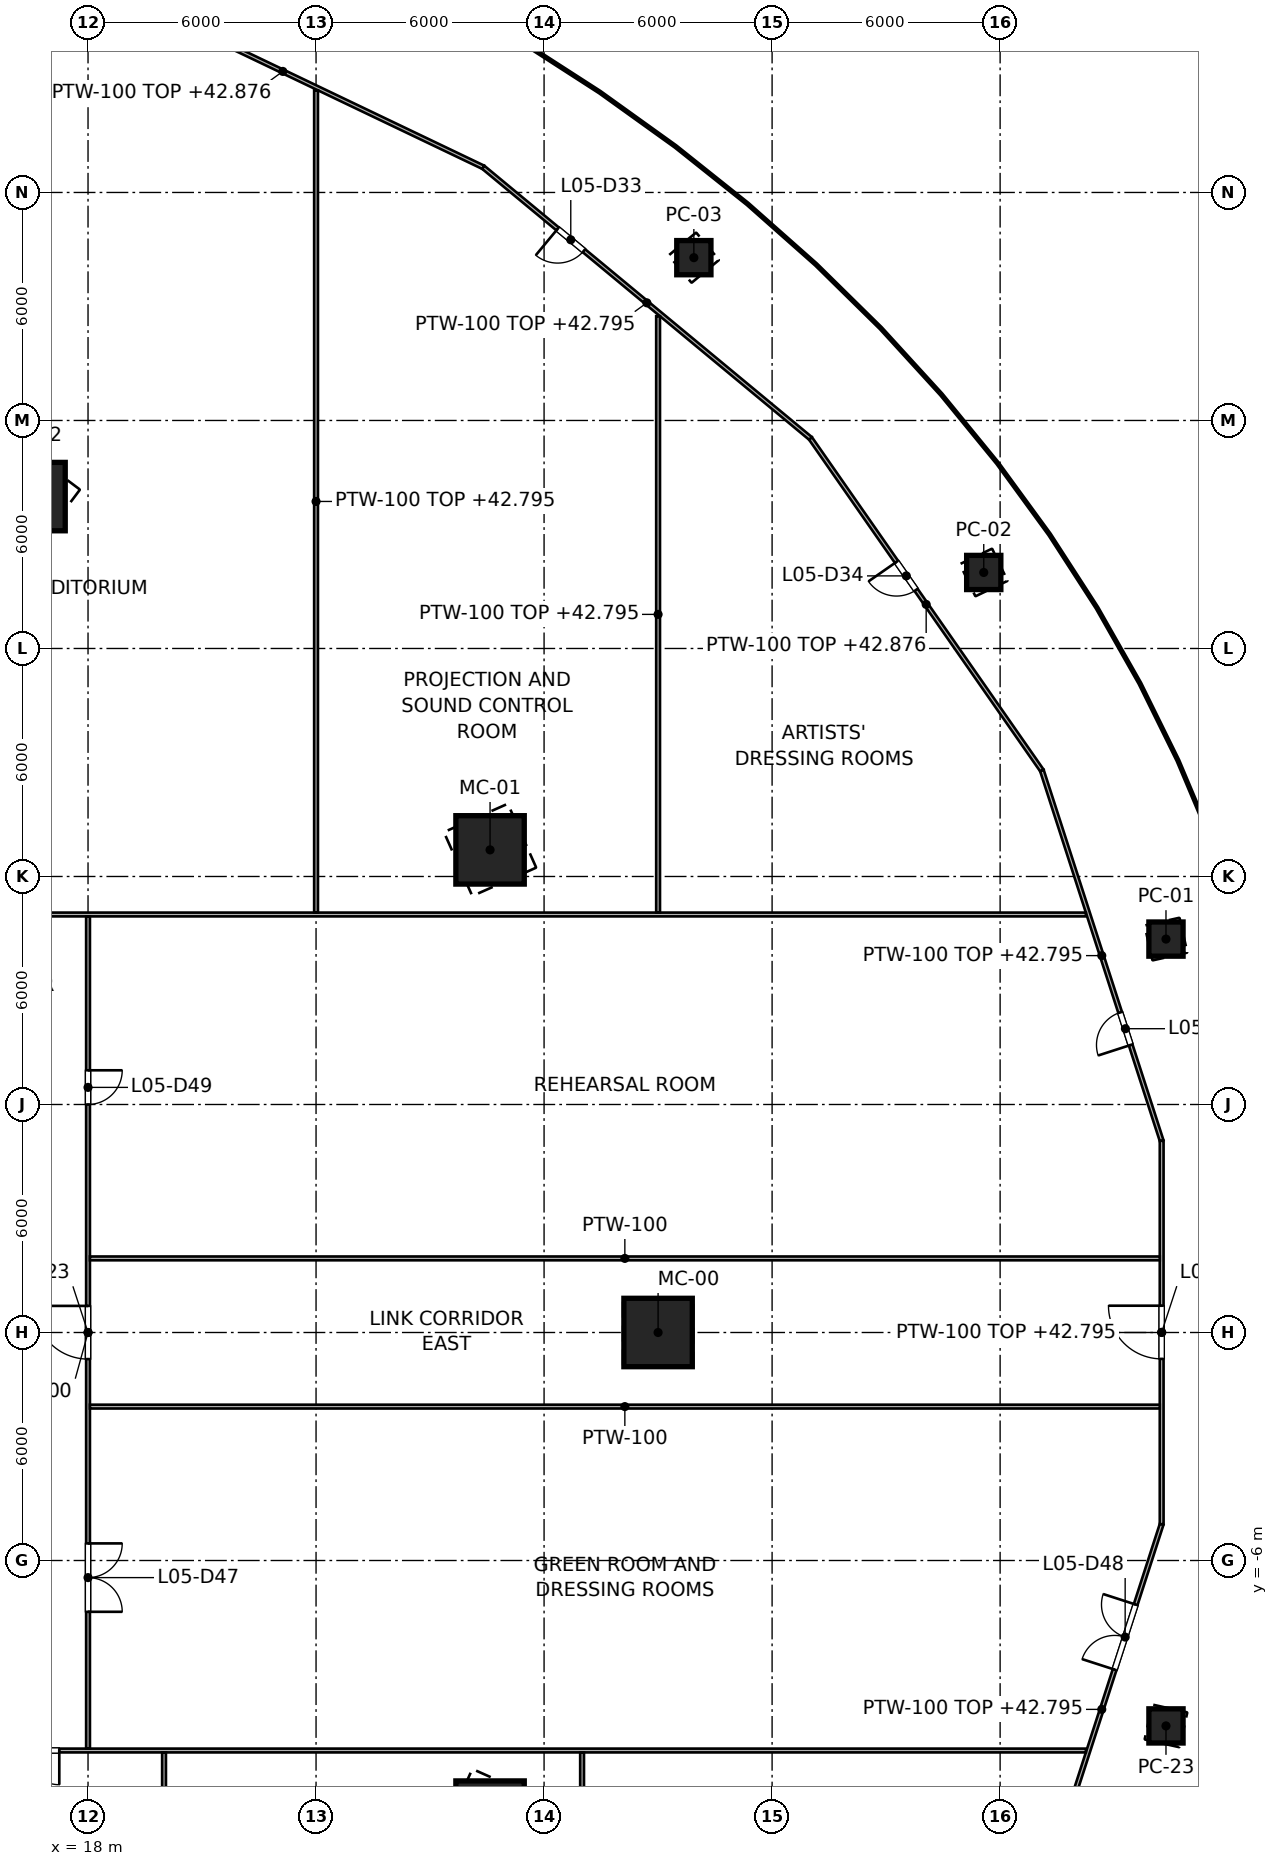
"""IFC4 building model, lengths in metres.
Left out: names, types, materials, properties, quantities, classifications, styles, units other than length and angle.
Written with IfcOpenShell. Run it as: python <this file> out.ifc"""

import sys

from ifc_helpers import new_model, si_unit, direction, frame, frame_2d, origin, origin_2d, place, context, subcontext, project, spatial, rectangle, hollow_rectangle, extrude, element, fill, save


model = new_model("IFC4")
c1 = context("Model", 3, precision=1e-05, world=origin(), true_north=direction((0.0, 1.0)))
c2 = subcontext(c1, "Body", "Model", "MODEL_VIEW")
j1 = project(units=[si_unit("LENGTHUNIT", "METRE"), si_unit("PLANEANGLEUNIT", "RADIAN")], contexts=[c1])
p1 = place(None, origin())
s1 = spatial("IfcSite", under=j1, at=p1, CompositionType="ELEMENT")
p2 = place(p1, origin())
s2 = spatial("IfcBuilding", under=s1, at=p2, CompositionType="ELEMENT")
p3 = place(p2, frame((0.0, 0.0, 37.4)))
s3 = spatial("IfcBuildingStorey", under=s2, at=p3, CompositionType="ELEMENT", Elevation=37.4)
for number, where, z_axis, x_axis in (
    (1, (33.0, 0.0, 0.0), (0.0, 0.0, 1.0), (1.0, 0.0, 0.0)),
    (2, (28.579, 12.7, 0.0), (0.0, 0.0, 1.0), (0.914, 0.406, 0.0)),
    (3, (16.5, 21.997, 0.0), (0.0, 0.0, 1.0), (0.6, 0.8, 0.0)),
    (4, (28.579, -12.7, 0.0), (0.0, 0.0, 1.0), (0.914, -0.406, 0.0)),
):
    element("IfcColumn", number, at=place(p3, frame(where, z_axis=z_axis, x_axis=x_axis)), inside=s3, PredefinedType="COLUMN", context=c2, shape_type="SweptSolid", body=[
        extrude(hollow_rectangle(XDim=1.8, YDim=1.8, WallThickness=0.08, at=origin_2d()), origin(), (0.0, 0.0, 1.0), 5.9),
    ])
for number, where, z_axis, x_axis in (
    (5, (46.365, 10.353, 0.0), (0.0, 0.0, 1.0), (0.976, 0.218, 0.0)),
    (6, (41.569, 20.0, 0.0), (0.0, 0.0, 1.0), (0.901, 0.434, 0.0)),
    (7, (33.941, 28.284, 0.0), (0.0, 0.0, 1.0), (0.768, 0.64, 0.0)),
    (8, (46.365, -10.353, 0.0), (0.0, 0.0, 1.0), (0.976, -0.218, 0.0)),
):
    element("IfcColumn", number, at=place(p3, frame(where, z_axis=z_axis, x_axis=x_axis)), inside=s3, PredefinedType="COLUMN", context=c2, shape_type="SweptSolid", body=[
        extrude(hollow_rectangle(XDim=0.9, YDim=0.9, WallThickness=0.04, at=origin_2d()), origin(), (0.0, 0.0, 1.0), 6.6),
    ])
p4 = place(p3, frame((46.251, 5.045, 0.0), z_axis=(0.0, 0.0, 1.0), x_axis=(-0.307713034182, 0.951479210805, 0.0)))
e9 = element("IfcWall", 9, at=p4, inside=s3, PredefinedType="PARTITIONING", context=c2, shape_type="SweptSolid", body=[
    extrude(rectangle(XDim=10.243, YDim=0.1, at=frame_2d((5.122, 0.0))), origin(), (0.0, 0.0, 1.0), 5.395),
])
p5 = place(p4, frame((2.65, 0.0, 0.0)))
e10 = element("IfcOpeningElement", 10, at=p5, cuts=e9, PredefinedType="OPENING", context=c2, shape_type="SweptSolid", body=[
    extrude(rectangle(XDim=0.9, YDim=2.1, at=frame_2d((0.45, 1.05))), frame((0.0, 0.05, 0.0), z_axis=(0.0, -1.0, 0.0), x_axis=(1.0, 0.0, 0.0)), (0.0, 0.0, 1.0), 0.1),
])
p6 = place(p3, frame((43.099, 14.791, 0.0), z_axis=(0.0, 0.0, 1.0), x_axis=(-0.571737958261, 0.820436290692, 0.0)))
e11 = element("IfcWall", 11, at=p6, inside=s3, PredefinedType="PARTITIONING", context=c2, shape_type="SweptSolid", body=[
    extrude(rectangle(XDim=10.65, YDim=0.1, at=frame_2d((5.325, 0.0))), origin(), (0.0, 0.0, 1.0), 5.476),
])
p7 = place(p6, frame((5.79, 0.0, 0.0)))
e12 = element("IfcOpeningElement", 12, at=p7, cuts=e11, PredefinedType="OPENING", context=c2, shape_type="SweptSolid", body=[
    extrude(rectangle(XDim=0.9, YDim=2.1, at=frame_2d((0.45, 1.05))), frame((0.0, 0.05, 0.0), z_axis=(0.0, -1.0, 0.0), x_axis=(1.0, 0.0, 0.0)), (0.0, 0.0, 1.0), 0.1),
])
p8 = place(p3, frame((37.01, 23.529, 0.0), z_axis=(0.0, 0.0, 1.0), x_axis=(-0.770046995363, 0.637987166746, 0.0)))
e13 = element("IfcWall", 13, at=p8, inside=s3, PredefinedType="PARTITIONING", context=c2, shape_type="SweptSolid", body=[
    extrude(rectangle(XDim=11.183, YDim=0.1, at=frame_2d((5.591, 0.0))), origin(), (0.0, 0.0, 1.0), 5.395),
])
p9 = place(p8, frame((7.741, 0.0, 0.0)))
e14 = element("IfcOpeningElement", 14, at=p9, cuts=e13, PredefinedType="OPENING", context=c2, shape_type="SweptSolid", body=[
    extrude(rectangle(XDim=0.9, YDim=2.1, at=frame_2d((0.45, 1.05))), frame((0.0, 0.05, 0.0), z_axis=(0.0, -1.0, 0.0), x_axis=(1.0, 0.0, 0.0)), (0.0, 0.0, 1.0), 0.1),
])
p10 = place(p3, frame((28.399, 30.663, 0.0), z_axis=(0.0, 0.0, 1.0), x_axis=(-0.902100999032, 0.431524955878, 0.0)))
e15 = element("IfcWall", 15, at=p10, inside=s3, PredefinedType="PARTITIONING", context=c2, shape_type="SweptSolid", body=[
    extrude(rectangle(XDim=11.691, YDim=0.1, at=frame_2d((5.845, 0.0))), origin(), (0.0, 0.0, 1.0), 5.476),
])
p11 = place(p3, frame((43.099, -14.791, 0.0), z_axis=(0.0, 0.0, 1.0), x_axis=(0.307713034182, 0.951479210805, 0.0)))
e16 = element("IfcWall", 16, at=p11, inside=s3, PredefinedType="PARTITIONING", context=c2, shape_type="SweptSolid", body=[
    extrude(rectangle(XDim=10.243, YDim=0.1, at=frame_2d((5.122, 0.0))), origin(), (0.0, 0.0, 1.0), 5.395),
])
p12 = place(p11, frame((6.221, 0.0, 0.0)))
e17 = element("IfcOpeningElement", 17, at=p12, cuts=e16, PredefinedType="OPENING", context=c2, shape_type="SweptSolid", body=[
    extrude(rectangle(XDim=1.8, YDim=2.1, at=frame_2d((0.9, 1.05))), frame((0.0, 0.05, 0.0), z_axis=(0.0, -1.0, 0.0), x_axis=(1.0, 0.0, 0.0)), (0.0, 0.0, 1.0), 0.1),
])
p13 = place(p3, frame((46.251, -5.045, 0.0), z_axis=(0.0, 0.0, 1.0), x_axis=(0.0, 1.0, 0.0)))
e18 = element("IfcWall", 18, at=p13, inside=s3, PredefinedType="PARTITIONING", context=c2, shape_type="SweptSolid", body=[
    extrude(rectangle(XDim=10.09, YDim=0.1, at=frame_2d((5.045, 0.0))), origin(), (0.0, 0.0, 1.0), 5.395),
])
p14 = place(p13, frame((4.35, 0.0, 0.0)))
e19 = element("IfcOpeningElement", 19, at=p14, cuts=e18, PredefinedType="OPENING", context=c2, shape_type="SweptSolid", body=[
    extrude(rectangle(XDim=1.4, YDim=2.1, at=frame_2d((0.7, 1.05))), frame((0.0, 0.05, 0.0), z_axis=(0.0, -1.0, 0.0), x_axis=(1.0, 0.0, 0.0)), (0.0, 0.0, 1.0), 0.1),
])
p15 = place(p3, frame((-44.256, 11.0, 0.0), z_axis=(0.0, 0.0, 1.0), x_axis=(1.0, 0.0, 0.0)))
e20 = element("IfcWall", 20, at=p15, inside=s3, PredefinedType="PARTITIONING", context=c2, shape_type="SweptSolid", body=[
    extrude(rectangle(XDim=88.512, YDim=0.1, at=frame_2d((44.256, 0.0))), origin(), (0.0, 0.0, 1.0), 5.318),
])
p16 = place(p15, frame((54.2, 0.0, 0.0)))
e21 = element("IfcOpeningElement", 21, at=p16, cuts=e20, PredefinedType="OPENING", context=c2, shape_type="SweptSolid", body=[
    extrude(rectangle(XDim=1.4, YDim=2.1, at=frame_2d((0.7, 1.05))), frame((0.0, 0.05, 0.0), z_axis=(0.0, -1.0, 0.0), x_axis=(1.0, 0.0, 0.0)), (0.0, 0.0, 1.0), 0.1),
])
p17 = place(p15, frame((32.9, 0.0, 0.0)))
e22 = element("IfcOpeningElement", 22, at=p17, cuts=e20, PredefinedType="OPENING", context=c2, shape_type="SweptSolid", body=[
    extrude(rectangle(XDim=1.4, YDim=2.1, at=frame_2d((0.7, 1.05))), frame((0.0, 0.05, 0.0), z_axis=(0.0, -1.0, 0.0), x_axis=(1.0, 0.0, 0.0)), (0.0, 0.0, 1.0), 0.1),
])
p18 = place(p15, frame((28.95, 0.0, 0.0)))
e23 = element("IfcOpeningElement", 23, at=p18, cuts=e20, PredefinedType="OPENING", context=c2, shape_type="SweptSolid", body=[
    extrude(rectangle(XDim=1.8, YDim=2.1, at=frame_2d((0.9, 1.05))), frame((0.0, 0.05, 0.0), z_axis=(0.0, -1.0, 0.0), x_axis=(1.0, 0.0, 0.0)), (0.0, 0.0, 1.0), 0.1),
])
p19 = place(p15, frame((42.35, 0.0, 0.0)))
e24 = element("IfcOpeningElement", 24, at=p19, cuts=e20, PredefinedType="OPENING", context=c2, shape_type="SweptSolid", body=[
    extrude(rectangle(XDim=0.9, YDim=2.1, at=frame_2d((0.45, 1.05))), frame((0.0, 0.05, 0.0), z_axis=(0.0, -1.0, 0.0), x_axis=(1.0, 0.0, 0.0)), (0.0, 0.0, 1.0), 0.1),
])
p20 = place(p15, frame((49.6, 0.0, 0.0)))
e25 = element("IfcOpeningElement", 25, at=p20, cuts=e20, PredefinedType="OPENING", context=c2, shape_type="SweptSolid", body=[
    extrude(rectangle(XDim=1.8, YDim=2.1, at=frame_2d((0.9, 1.05))), frame((0.0, 0.05, 0.0), z_axis=(0.0, -1.0, 0.0), x_axis=(1.0, 0.0, 0.0)), (0.0, 0.0, 1.0), 0.1),
])
p21 = place(p3, frame((-44.256, -11.0, 0.0), z_axis=(0.0, 0.0, 1.0), x_axis=(1.0, 0.0, 0.0)))
e26 = element("IfcWall", 26, at=p21, inside=s3, PredefinedType="PARTITIONING", context=c2, shape_type="SweptSolid", body=[
    extrude(rectangle(XDim=88.512, YDim=0.1, at=frame_2d((44.256, 0.0))), origin(), (0.0, 0.0, 1.0), 5.318),
])
p22 = place(p21, frame((32.9, 0.0, 0.0)))
e27 = element("IfcOpeningElement", 27, at=p22, cuts=e26, PredefinedType="OPENING", context=c2, shape_type="SweptSolid", body=[
    extrude(rectangle(XDim=1.4, YDim=2.1, at=frame_2d((0.7, 1.05))), frame((0.0, 0.05, 0.0), z_axis=(0.0, -1.0, 0.0), x_axis=(1.0, 0.0, 0.0)), (0.0, 0.0, 1.0), 0.1),
])
p23 = place(p21, frame((54.2, 0.0, 0.0)))
e28 = element("IfcOpeningElement", 28, at=p23, cuts=e26, PredefinedType="OPENING", context=c2, shape_type="SweptSolid", body=[
    extrude(rectangle(XDim=1.4, YDim=2.1, at=frame_2d((0.7, 1.05))), frame((0.0, 0.05, 0.0), z_axis=(0.0, -1.0, 0.0), x_axis=(1.0, 0.0, 0.0)), (0.0, 0.0, 1.0), 0.1),
])
p24 = place(p21, frame((38.65, 0.0, 0.0)))
e29 = element("IfcOpeningElement", 29, at=p24, cuts=e26, PredefinedType="OPENING", context=c2, shape_type="SweptSolid", body=[
    extrude(rectangle(XDim=1.8, YDim=2.1, at=frame_2d((0.9, 1.05))), frame((0.0, 0.05, 0.0), z_axis=(0.0, -1.0, 0.0), x_axis=(1.0, 0.0, 0.0)), (0.0, 0.0, 1.0), 0.1),
])
p25 = place(p21, frame((46.85, 0.0, 0.0)))
e30 = element("IfcOpeningElement", 30, at=p25, cuts=e26, PredefinedType="OPENING", context=c2, shape_type="SweptSolid", body=[
    extrude(rectangle(XDim=0.9, YDim=2.1, at=frame_2d((0.45, 1.05))), frame((0.0, 0.05, 0.0), z_axis=(0.0, -1.0, 0.0), x_axis=(1.0, 0.0, 0.0)), (0.0, 0.0, 1.0), 0.1),
])
p26 = place(p21, frame((57.05, 0.0, 0.0)))
e31 = element("IfcOpeningElement", 31, at=p26, cuts=e26, PredefinedType="OPENING", context=c2, shape_type="SweptSolid", body=[
    extrude(rectangle(XDim=1.8, YDim=2.1, at=frame_2d((0.9, 1.05))), frame((0.0, 0.05, 0.0), z_axis=(0.0, -1.0, 0.0), x_axis=(1.0, 0.0, 0.0)), (0.0, 0.0, 1.0), 0.1),
])
p27 = place(p21, frame((60.6, 0.0, 0.0)))
e32 = element("IfcOpeningElement", 32, at=p27, cuts=e26, PredefinedType="OPENING", context=c2, shape_type="SweptSolid", body=[
    extrude(rectangle(XDim=0.9, YDim=2.1, at=frame_2d((0.45, 1.05))), frame((0.0, 0.05, 0.0), z_axis=(0.0, -1.0, 0.0), x_axis=(1.0, 0.0, 0.0)), (0.0, 0.0, 1.0), 0.1),
])
p28 = place(p3, frame((18.0, -10.95, 0.0), z_axis=(0.0, 0.0, 1.0), x_axis=(0.0, 1.0, 0.0)))
e33 = element("IfcWall", 33, at=p28, inside=s3, PredefinedType="PARTITIONING", context=c2, shape_type="SweptSolid", body=[
    extrude(rectangle(XDim=21.9, YDim=0.1, at=frame_2d((10.95, 0.0))), origin(), (0.0, 0.0, 1.0), 5.318),
])
p29 = place(p28, frame((10.25, 0.0, 0.0)))
e34 = element("IfcOpeningElement", 34, at=p29, cuts=e33, PredefinedType="OPENING", context=c2, shape_type="SweptSolid", body=[
    extrude(rectangle(XDim=1.4, YDim=2.1, at=frame_2d((0.7, 1.05))), frame((0.0, 0.05, 0.0), z_axis=(0.0, -1.0, 0.0), x_axis=(1.0, 0.0, 0.0)), (0.0, 0.0, 1.0), 0.1),
])
p30 = place(p28, frame((3.6, 0.0, 0.0)))
e35 = element("IfcOpeningElement", 35, at=p30, cuts=e33, PredefinedType="OPENING", context=c2, shape_type="SweptSolid", body=[
    extrude(rectangle(XDim=1.8, YDim=2.1, at=frame_2d((0.9, 1.05))), frame((0.0, 0.05, 0.0), z_axis=(0.0, -1.0, 0.0), x_axis=(1.0, 0.0, 0.0)), (0.0, 0.0, 1.0), 0.1),
])
p31 = place(p28, frame((16.95, 0.0, 0.0)))
e36 = element("IfcOpeningElement", 36, at=p31, cuts=e33, PredefinedType="OPENING", context=c2, shape_type="SweptSolid", body=[
    extrude(rectangle(XDim=0.9, YDim=2.1, at=frame_2d((0.45, 1.05))), frame((0.0, 0.05, 0.0), z_axis=(0.0, -1.0, 0.0), x_axis=(1.0, 0.0, 0.0)), (0.0, 0.0, 1.0), 0.1),
])
p32 = place(p3, frame((24.0, 11.05, 0.0), z_axis=(0.0, 0.0, 1.0), x_axis=(0.0, 1.0, 0.0)))
e37 = element("IfcWall", 37, at=p32, inside=s3, PredefinedType="PARTITIONING", context=c2, shape_type="SweptSolid", body=[
    extrude(rectangle(XDim=21.638, YDim=0.1, at=frame_2d((10.819, 0.0))), origin(), (0.0, 0.0, 1.0), 5.395),
])
p33 = place(p3, frame((33.0, 11.05, 0.0), z_axis=(0.0, 0.0, 1.0), x_axis=(0.0, 1.0, 0.0)))
e38 = element("IfcWall", 38, at=p33, inside=s3, PredefinedType="PARTITIONING", context=c2, shape_type="SweptSolid", body=[
    extrude(rectangle(XDim=15.694, YDim=0.1, at=frame_2d((7.847, 0.0))), origin(), (0.0, 0.0, 1.0), 5.395),
])
p34 = place(p3, frame((20.0, -11.05, 0.0), z_axis=(0.0, 0.0, 1.0), x_axis=(0.0, -1.0, 0.0)))
e39 = element("IfcWall", 39, at=p34, inside=s3, PredefinedType="PARTITIONING", context=c2, shape_type="SweptSolid", body=[
    extrude(rectangle(XDim=23.551, YDim=0.1, at=frame_2d((11.776, 0.0))), origin(), (0.0, 0.0, 1.0), 5.327),
])
p35 = place(p3, frame((31.0, -11.05, 0.0), z_axis=(0.0, 0.0, 1.0), x_axis=(0.0, -1.0, 0.0)))
e40 = element("IfcWall", 40, at=p35, inside=s3, PredefinedType="PARTITIONING", context=c2, shape_type="SweptSolid", body=[
    extrude(rectangle(XDim=17.352, YDim=0.1, at=frame_2d((8.676, 0.0))), origin(), (0.0, 0.0, 1.0), 5.395),
])
for number, where, z_axis, x_axis in (
    (41, (18.05, -1.95, 0.0), (0.0, 0.0, 1.0), (1.0, 0.0, 0.0)),
    (42, (18.05, 1.95, 0.0), (0.0, 0.0, 1.0), (1.0, 0.0, 0.0)),
):
    element("IfcWall", number, at=place(p3, frame(where, z_axis=z_axis, x_axis=x_axis)), inside=s3, PredefinedType="PARTITIONING", context=c2, shape_type="SweptSolid", body=[
        extrude(rectangle(XDim=28.151, YDim=0.1, at=frame_2d((14.075, 0.0))), origin(), (0.0, 0.0, 1.0), 5.318),
    ])
p36 = place(p29, origin())
e43 = element("IfcDoor", 43, at=p36, inside=s3, OperationType="SINGLE_SWING_RIGHT", PredefinedType="DOOR", context=c2, shape_type="SweptSolid", body=[
    extrude(rectangle(XDim=1.4, YDim=2.1, at=frame_2d((0.7, 1.05))), frame((0.0, 0.025, 0.0), z_axis=(0.0, -1.0, 0.0), x_axis=(1.0, 0.0, 0.0)), (0.0, 0.0, 1.0), 0.05),
])
fill(e34, e43)
p37 = place(p14, origin())
e44 = element("IfcDoor", 44, at=p37, inside=s3, OperationType="SINGLE_SWING_RIGHT", PredefinedType="DOOR", context=c2, shape_type="SweptSolid", body=[
    extrude(rectangle(XDim=1.4, YDim=2.1, at=frame_2d((0.7, 1.05))), frame((0.0, 0.025, 0.0), z_axis=(0.0, -1.0, 0.0), x_axis=(1.0, 0.0, 0.0)), (0.0, 0.0, 1.0), 0.05),
])
fill(e19, e44)
p38 = place(p9, origin())
e45 = element("IfcDoor", 45, at=p38, inside=s3, OperationType="SINGLE_SWING_RIGHT", PredefinedType="DOOR", context=c2, shape_type="SweptSolid", body=[
    extrude(rectangle(XDim=0.9, YDim=2.1, at=frame_2d((0.45, 1.05))), frame((0.0, 0.025, 0.0), z_axis=(0.0, -1.0, 0.0), x_axis=(1.0, 0.0, 0.0)), (0.0, 0.0, 1.0), 0.05),
])
fill(e14, e45)
p39 = place(p7, origin())
e46 = element("IfcDoor", 46, at=p39, inside=s3, OperationType="SINGLE_SWING_RIGHT", PredefinedType="DOOR", context=c2, shape_type="SweptSolid", body=[
    extrude(rectangle(XDim=0.9, YDim=2.1, at=frame_2d((0.45, 1.05))), frame((0.0, 0.025, 0.0), z_axis=(0.0, -1.0, 0.0), x_axis=(1.0, 0.0, 0.0)), (0.0, 0.0, 1.0), 0.05),
])
fill(e12, e46)
p40 = place(p27, origin())
e47 = element("IfcDoor", 47, at=p40, inside=s3, OperationType="SINGLE_SWING_RIGHT", PredefinedType="DOOR", context=c2, shape_type="SweptSolid", body=[
    extrude(rectangle(XDim=0.9, YDim=2.1, at=frame_2d((0.45, 1.05))), frame((0.0, 0.025, 0.0), z_axis=(0.0, -1.0, 0.0), x_axis=(1.0, 0.0, 0.0)), (0.0, 0.0, 1.0), 0.05),
])
fill(e32, e47)
p41 = place(p30, origin())
e48 = element("IfcDoor", 48, at=p41, inside=s3, OperationType="DOUBLE_DOOR_SINGLE_SWING", PredefinedType="DOOR", context=c2, shape_type="SweptSolid", body=[
    extrude(rectangle(XDim=1.8, YDim=2.1, at=frame_2d((0.9, 1.05))), frame((0.0, 0.025, 0.0), z_axis=(0.0, -1.0, 0.0), x_axis=(1.0, 0.0, 0.0)), (0.0, 0.0, 1.0), 0.05),
])
fill(e35, e48)
p42 = place(p12, origin())
e49 = element("IfcDoor", 49, at=p42, inside=s3, OperationType="DOUBLE_DOOR_SINGLE_SWING", PredefinedType="DOOR", context=c2, shape_type="SweptSolid", body=[
    extrude(rectangle(XDim=1.8, YDim=2.1, at=frame_2d((0.9, 1.05))), frame((0.0, 0.025, 0.0), z_axis=(0.0, -1.0, 0.0), x_axis=(1.0, 0.0, 0.0)), (0.0, 0.0, 1.0), 0.05),
])
fill(e17, e49)
p43 = place(p31, origin())
e50 = element("IfcDoor", 50, at=p43, inside=s3, OperationType="SINGLE_SWING_RIGHT", PredefinedType="DOOR", context=c2, shape_type="SweptSolid", body=[
    extrude(rectangle(XDim=0.9, YDim=2.1, at=frame_2d((0.45, 1.05))), frame((0.0, 0.025, 0.0), z_axis=(0.0, -1.0, 0.0), x_axis=(1.0, 0.0, 0.0)), (0.0, 0.0, 1.0), 0.05),
])
fill(e36, e50)
p44 = place(p5, origin())
e51 = element("IfcDoor", 51, at=p44, inside=s3, OperationType="SINGLE_SWING_LEFT", PredefinedType="DOOR", context=c2, shape_type="SweptSolid", body=[
    extrude(rectangle(XDim=0.9, YDim=2.1, at=frame_2d((0.45, 1.05))), frame((0.0, 0.025, 0.0), z_axis=(0.0, -1.0, 0.0), x_axis=(1.0, 0.0, 0.0)), (0.0, 0.0, 1.0), 0.05),
])
fill(e10, e51)
save(model, sys.argv[1])
